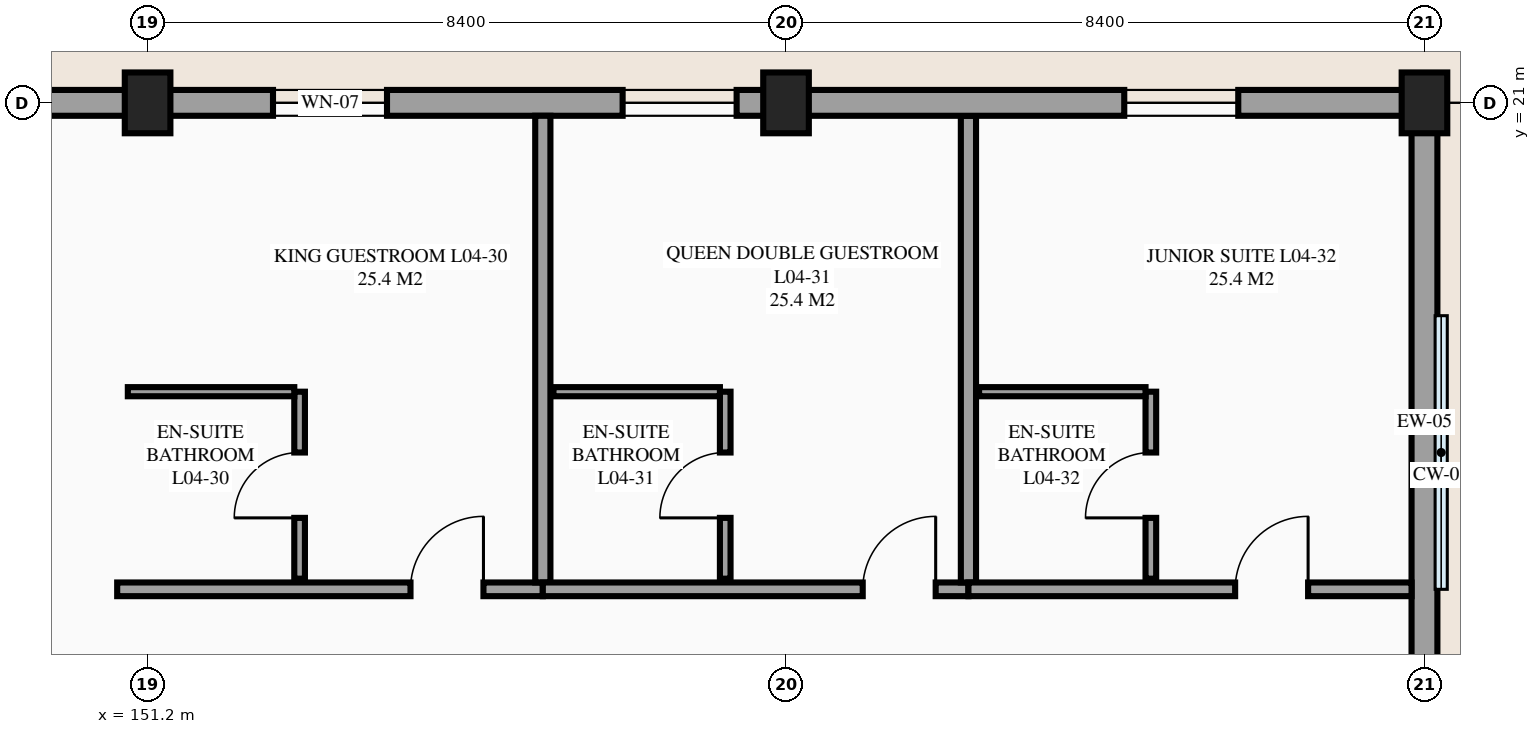
"""IFC4 building model, lengths in metres.
Left out: names, types, materials, properties, quantities, classifications, styles, units other than length and angle.
Written with IfcOpenShell. Run it as: python <this file> out.ifc"""

import sys

from ifc_helpers import new_model, si_unit, direction, frame, frame_2d, origin, origin_2d, place, context, subcontext, project, spatial, rectangle, extrude, element, fill, save


model = new_model("IFC4")
c1 = context("Model", 3, precision=1e-05, world=origin(), true_north=direction((0.0, 1.0)))
c2 = subcontext(c1, "Body", "Model", "MODEL_VIEW")
j1 = project(units=[si_unit("LENGTHUNIT", "METRE"), si_unit("PLANEANGLEUNIT", "RADIAN")], contexts=[c1])
p1 = place(None, origin())
s1 = spatial("IfcSite", under=j1, at=p1, CompositionType="ELEMENT")
p2 = place(p1, origin())
s2 = spatial("IfcBuilding", under=s1, at=p2, CompositionType="ELEMENT")
p3 = place(p2, frame((0.0, 0.0, 18.3)))
s3 = spatial("IfcBuildingStorey", under=s2, at=p3, CompositionType="ELEMENT", Elevation=18.3)
for number, where, z_axis, x_axis in (
    (1, (151.2, 21.0, 0.0), (0.0, 0.0, 1.0), (1.0, 0.0, 0.0)),
    (2, (159.6, 21.0, 0.0), (0.0, 0.0, 1.0), (1.0, 0.0, 0.0)),
    (3, (168.0, 21.0, 0.0), (0.0, 0.0, 1.0), (1.0, 0.0, 0.0)),
):
    element("IfcColumn", number, at=place(p3, frame(where, z_axis=z_axis, x_axis=x_axis)), inside=s3, PredefinedType="COLUMN", context=c2, shape_type="SweptSolid", body=[
        extrude(rectangle(XDim=0.6, YDim=0.8, at=origin_2d()), origin(), (0.0, 0.0, 1.0), 3.6),
    ])
p4 = place(p3, frame((168.0, 12.6, 0.0), z_axis=(0.0, 0.0, 1.0), x_axis=(0.0, 1.0, 0.0)))
e4 = element("IfcWall", 4, at=p4, inside=s3, PredefinedType="STANDARD", context=c2, shape_type="SweptSolid", body=[
    extrude(rectangle(XDim=8.4, YDim=0.34, at=frame_2d((4.2, 0.0))), origin(), (0.0, 0.0, 1.0), 2.43),
])
p5 = place(p3, frame((159.6, 21.0, 0.0), z_axis=(0.0, 0.0, 1.0), x_axis=(-1.0, 0.0, 0.0)))
e5 = element("IfcWall", 5, at=p5, inside=s3, PredefinedType="STANDARD", context=c2, shape_type="SweptSolid", body=[
    extrude(rectangle(XDim=8.4, YDim=0.34, at=frame_2d((4.2, 0.0))), origin(), (0.0, 0.0, 1.0), 2.63),
])
p6 = place(p5, frame((5.25, 0.0, 0.85)))
e6 = element("IfcOpeningElement", 6, at=p6, cuts=e5, PredefinedType="OPENING", context=c2, shape_type="SweptSolid", body=[
    extrude(rectangle(XDim=1.5, YDim=1.5, at=frame_2d((0.75, 0.75))), frame((0.0, 0.18, 0.0), z_axis=(0.0, -1.0, 0.0), x_axis=(1.0, 0.0, 0.0)), (0.0, 0.0, 1.0), 0.36),
])
p7 = place(p5, frame((0.65, 0.0, 0.85)))
e7 = element("IfcOpeningElement", 7, at=p7, cuts=e5, PredefinedType="OPENING", context=c2, shape_type="SweptSolid", body=[
    extrude(rectangle(XDim=1.5, YDim=1.5, at=frame_2d((0.75, 0.75))), frame((0.0, 0.18, 0.0), z_axis=(0.0, -1.0, 0.0), x_axis=(1.0, 0.0, 0.0)), (0.0, 0.0, 1.0), 0.36),
])
p8 = place(p3, frame((150.8, 14.6, 0.0), z_axis=(0.0, 0.0, 1.0), x_axis=(1.0, 0.0, 0.0)))
e8 = element("IfcWall", 8, at=p8, inside=s3, PredefinedType="PARTITIONING", context=c2, shape_type="SweptSolid", body=[
    extrude(rectangle(XDim=5.6, YDim=0.18, at=frame_2d((2.8, 0.0))), origin(), (0.0, 0.0, 1.0), 3.375),
])
p9 = place(p8, frame((3.859, 0.0, 0.0)))
e9 = element("IfcOpeningElement", 9, at=p9, cuts=e8, PredefinedType="OPENING", context=c2, shape_type="SweptSolid", body=[
    extrude(rectangle(XDim=0.96, YDim=2.15, at=frame_2d((0.48, 1.075))), frame((0.0, 0.1, 0.0), z_axis=(0.0, -1.0, 0.0), x_axis=(1.0, 0.0, 0.0)), (0.0, 0.0, 1.0), 0.2),
])
p10 = place(p3, frame((156.4, 14.69, 0.0), z_axis=(0.0, 0.0, 1.0), x_axis=(0.0, 1.0, 0.0)))
e10 = element("IfcWall", 10, at=p10, inside=s3, PredefinedType="PARTITIONING", context=c2, shape_type="SweptSolid", body=[
    extrude(rectangle(XDim=6.14, YDim=0.2, at=frame_2d((3.07, 0.0))), origin(), (0.0, 0.0, 1.0), 3.375),
])
p11 = place(p3, frame((153.2, 14.74, 0.0), z_axis=(0.0, 0.0, 1.0), x_axis=(0.0, 1.0, 0.0)))
e11 = element("IfcWall", 11, at=p11, inside=s3, PredefinedType="PARTITIONING", context=c2, shape_type="SweptSolid", body=[
    extrude(rectangle(XDim=2.46, YDim=0.14, at=frame_2d((1.23, 0.0))), origin(), (0.0, 0.0, 1.0), 3.375),
])
p12 = place(p11, frame((0.8, 0.0, 0.0)))
e12 = element("IfcOpeningElement", 12, at=p12, cuts=e11, PredefinedType="OPENING", context=c2, shape_type="SweptSolid", body=[
    extrude(rectangle(XDim=0.86, YDim=2.1, at=frame_2d((0.43, 1.05))), frame((0.0, 0.08, 0.0), z_axis=(0.0, -1.0, 0.0), x_axis=(1.0, 0.0, 0.0)), (0.0, 0.0, 1.0), 0.16),
])
p13 = place(p3, frame((150.94, 17.2, 0.0), z_axis=(0.0, 0.0, 1.0), x_axis=(1.0, 0.0, 0.0)))
e13 = element("IfcWall", 13, at=p13, inside=s3, PredefinedType="PARTITIONING", context=c2, shape_type="SweptSolid", body=[
    extrude(rectangle(XDim=2.19, YDim=0.12, at=frame_2d((1.095, 0.0))), origin(), (0.0, 0.0, 1.0), 3.375),
])
p14 = place(p3, frame((156.4, 14.6, 0.0), z_axis=(0.0, 0.0, 1.0), x_axis=(1.0, 0.0, 0.0)))
e14 = element("IfcWall", 14, at=p14, inside=s3, PredefinedType="PARTITIONING", context=c2, shape_type="SweptSolid", body=[
    extrude(rectangle(XDim=5.6, YDim=0.18, at=frame_2d((2.8, 0.0))), origin(), (0.0, 0.0, 1.0), 3.375),
])
p15 = place(p14, frame((4.209, 0.0, 0.0)))
e15 = element("IfcOpeningElement", 15, at=p15, cuts=e14, PredefinedType="OPENING", context=c2, shape_type="SweptSolid", body=[
    extrude(rectangle(XDim=0.96, YDim=2.15, at=frame_2d((0.48, 1.075))), frame((0.0, 0.1, 0.0), z_axis=(0.0, -1.0, 0.0), x_axis=(1.0, 0.0, 0.0)), (0.0, 0.0, 1.0), 0.2),
])
p16 = place(p3, frame((162.0, 14.69, 0.0), z_axis=(0.0, 0.0, 1.0), x_axis=(0.0, 1.0, 0.0)))
e16 = element("IfcWall", 16, at=p16, inside=s3, PredefinedType="PARTITIONING", context=c2, shape_type="SweptSolid", body=[
    extrude(rectangle(XDim=6.14, YDim=0.2, at=frame_2d((3.07, 0.0))), origin(), (0.0, 0.0, 1.0), 3.375),
])
p17 = place(p3, frame((158.8, 14.74, 0.0), z_axis=(0.0, 0.0, 1.0), x_axis=(0.0, 1.0, 0.0)))
e17 = element("IfcWall", 17, at=p17, inside=s3, PredefinedType="PARTITIONING", context=c2, shape_type="SweptSolid", body=[
    extrude(rectangle(XDim=2.46, YDim=0.14, at=frame_2d((1.23, 0.0))), origin(), (0.0, 0.0, 1.0), 3.375),
])
p18 = place(p17, frame((0.8, 0.0, 0.0)))
e18 = element("IfcOpeningElement", 18, at=p18, cuts=e17, PredefinedType="OPENING", context=c2, shape_type="SweptSolid", body=[
    extrude(rectangle(XDim=0.86, YDim=2.1, at=frame_2d((0.43, 1.05))), frame((0.0, 0.08, 0.0), z_axis=(0.0, -1.0, 0.0), x_axis=(1.0, 0.0, 0.0)), (0.0, 0.0, 1.0), 0.16),
])
p19 = place(p3, frame((156.54, 17.2, 0.0), z_axis=(0.0, 0.0, 1.0), x_axis=(1.0, 0.0, 0.0)))
e19 = element("IfcWall", 19, at=p19, inside=s3, PredefinedType="PARTITIONING", context=c2, shape_type="SweptSolid", body=[
    extrude(rectangle(XDim=2.19, YDim=0.12, at=frame_2d((1.095, 0.0))), origin(), (0.0, 0.0, 1.0), 3.375),
])
p20 = place(p3, frame((162.0, 14.6, 0.0), z_axis=(0.0, 0.0, 1.0), x_axis=(1.0, 0.0, 0.0)))
e20 = element("IfcWall", 20, at=p20, inside=s3, PredefinedType="PARTITIONING", context=c2, shape_type="SweptSolid", body=[
    extrude(rectangle(XDim=5.83, YDim=0.18, at=frame_2d((2.915, 0.0))), origin(), (0.0, 0.0, 1.0), 3.375),
])
p21 = place(p20, frame((3.509, 0.0, 0.0)))
e21 = element("IfcOpeningElement", 21, at=p21, cuts=e20, PredefinedType="OPENING", context=c2, shape_type="SweptSolid", body=[
    extrude(rectangle(XDim=0.96, YDim=2.15, at=frame_2d((0.48, 1.075))), frame((0.0, 0.1, 0.0), z_axis=(0.0, -1.0, 0.0), x_axis=(1.0, 0.0, 0.0)), (0.0, 0.0, 1.0), 0.2),
])
p22 = place(p3, frame((164.4, 14.74, 0.0), z_axis=(0.0, 0.0, 1.0), x_axis=(0.0, 1.0, 0.0)))
e22 = element("IfcWall", 22, at=p22, inside=s3, PredefinedType="PARTITIONING", context=c2, shape_type="SweptSolid", body=[
    extrude(rectangle(XDim=2.46, YDim=0.14, at=frame_2d((1.23, 0.0))), origin(), (0.0, 0.0, 1.0), 3.375),
])
p23 = place(p22, frame((0.8, 0.0, 0.0)))
e23 = element("IfcOpeningElement", 23, at=p23, cuts=e22, PredefinedType="OPENING", context=c2, shape_type="SweptSolid", body=[
    extrude(rectangle(XDim=0.86, YDim=2.1, at=frame_2d((0.43, 1.05))), frame((0.0, 0.08, 0.0), z_axis=(0.0, -1.0, 0.0), x_axis=(1.0, 0.0, 0.0)), (0.0, 0.0, 1.0), 0.16),
])
p24 = place(p3, frame((162.14, 17.2, 0.0), z_axis=(0.0, 0.0, 1.0), x_axis=(1.0, 0.0, 0.0)))
e24 = element("IfcWall", 24, at=p24, inside=s3, PredefinedType="PARTITIONING", context=c2, shape_type="SweptSolid", body=[
    extrude(rectangle(XDim=2.19, YDim=0.12, at=frame_2d((1.095, 0.0))), origin(), (0.0, 0.0, 1.0), 3.375),
])
p25 = place(p3, frame((168.0, 21.0, 0.0), z_axis=(0.0, 0.0, 1.0), x_axis=(-1.0, 0.0, 0.0)))
e25 = element("IfcWall", 25, at=p25, inside=s3, PredefinedType="STANDARD", context=c2, shape_type="SweptSolid", body=[
    extrude(rectangle(XDim=8.4, YDim=0.34, at=frame_2d((4.2, 0.0))), origin(), (0.0, 0.0, 1.0), 2.73),
])
p26 = place(p25, frame((2.45, 0.0, 0.85)))
e26 = element("IfcOpeningElement", 26, at=p26, cuts=e25, PredefinedType="OPENING", context=c2, shape_type="SweptSolid", body=[
    extrude(rectangle(XDim=1.5, YDim=1.5, at=frame_2d((0.75, 0.75))), frame((0.0, 0.18, 0.0), z_axis=(0.0, -1.0, 0.0), x_axis=(1.0, 0.0, 0.0)), (0.0, 0.0, 1.0), 0.36),
])
p27 = place(p3, frame((151.2, 21.0, 0.0), z_axis=(0.0, 0.0, 1.0), x_axis=(-1.0, 0.0, 0.0)))
e27 = element("IfcWall", 27, at=p27, inside=s3, PredefinedType="STANDARD", context=c2, shape_type="SweptSolid", body=[
    extrude(rectangle(XDim=2.0, YDim=0.34, at=frame_2d((1.0, 0.0))), origin(), (0.0, 0.0, 1.0), 2.88),
])
p28 = place(p6, origin())
e28 = element("IfcWindow", 28, at=p28, inside=s3, PartitioningType="SINGLE_PANEL", PredefinedType="WINDOW", context=c2, shape_type="SweptSolid", body=[
    extrude(rectangle(XDim=1.5, YDim=1.5, at=frame_2d((0.75, 0.75))), frame((0.0, 0.03, 0.0), z_axis=(0.0, -1.0, 0.0), x_axis=(1.0, 0.0, 0.0)), (0.0, 0.0, 1.0), 0.06),
])
fill(e6, e28)
p29 = place(p7, origin())
e29 = element("IfcWindow", 29, at=p29, inside=s3, PartitioningType="SINGLE_PANEL", PredefinedType="WINDOW", context=c2, shape_type="SweptSolid", body=[
    extrude(rectangle(XDim=1.5, YDim=1.5, at=frame_2d((0.75, 0.75))), frame((0.0, 0.03, 0.0), z_axis=(0.0, -1.0, 0.0), x_axis=(1.0, 0.0, 0.0)), (0.0, 0.0, 1.0), 0.06),
])
fill(e7, e29)
p30 = place(p26, origin())
e30 = element("IfcWindow", 30, at=p30, inside=s3, PartitioningType="SINGLE_PANEL", PredefinedType="WINDOW", context=c2, shape_type="SweptSolid", body=[
    extrude(rectangle(XDim=1.5, YDim=1.5, at=frame_2d((0.75, 0.75))), frame((0.0, 0.03, 0.0), z_axis=(0.0, -1.0, 0.0), x_axis=(1.0, 0.0, 0.0)), (0.0, 0.0, 1.0), 0.06),
])
fill(e26, e30)
p31 = place(p9, origin())
e31 = element("IfcDoor", 31, at=p31, inside=s3, OperationType="SINGLE_SWING_RIGHT", PredefinedType="DOOR", context=c2, shape_type="SweptSolid", body=[
    extrude(rectangle(XDim=0.96, YDim=2.15, at=frame_2d((0.48, 1.075))), frame((0.0, 0.025, 0.0), z_axis=(0.0, -1.0, 0.0), x_axis=(1.0, 0.0, 0.0)), (0.0, 0.0, 1.0), 0.05),
])
fill(e9, e31)
p32 = place(p12, origin())
e32 = element("IfcDoor", 32, at=p32, inside=s3, OperationType="SINGLE_SWING_LEFT", PredefinedType="DOOR", context=c2, shape_type="SweptSolid", body=[
    extrude(rectangle(XDim=0.86, YDim=2.1, at=frame_2d((0.43, 1.05))), frame((0.0, 0.025, 0.0), z_axis=(0.0, -1.0, 0.0), x_axis=(1.0, 0.0, 0.0)), (0.0, 0.0, 1.0), 0.05),
])
fill(e12, e32)
p33 = place(p15, origin())
e33 = element("IfcDoor", 33, at=p33, inside=s3, OperationType="SINGLE_SWING_RIGHT", PredefinedType="DOOR", context=c2, shape_type="SweptSolid", body=[
    extrude(rectangle(XDim=0.96, YDim=2.15, at=frame_2d((0.48, 1.075))), frame((0.0, 0.025, 0.0), z_axis=(0.0, -1.0, 0.0), x_axis=(1.0, 0.0, 0.0)), (0.0, 0.0, 1.0), 0.05),
])
fill(e15, e33)
p34 = place(p18, origin())
e34 = element("IfcDoor", 34, at=p34, inside=s3, OperationType="SINGLE_SWING_LEFT", PredefinedType="DOOR", context=c2, shape_type="SweptSolid", body=[
    extrude(rectangle(XDim=0.86, YDim=2.1, at=frame_2d((0.43, 1.05))), frame((0.0, 0.025, 0.0), z_axis=(0.0, -1.0, 0.0), x_axis=(1.0, 0.0, 0.0)), (0.0, 0.0, 1.0), 0.05),
])
fill(e18, e34)
p35 = place(p21, origin())
e35 = element("IfcDoor", 35, at=p35, inside=s3, OperationType="SINGLE_SWING_RIGHT", PredefinedType="DOOR", context=c2, shape_type="SweptSolid", body=[
    extrude(rectangle(XDim=0.96, YDim=2.15, at=frame_2d((0.48, 1.075))), frame((0.0, 0.025, 0.0), z_axis=(0.0, -1.0, 0.0), x_axis=(1.0, 0.0, 0.0)), (0.0, 0.0, 1.0), 0.05),
])
fill(e21, e35)
p36 = place(p23, origin())
e36 = element("IfcDoor", 36, at=p36, inside=s3, OperationType="SINGLE_SWING_LEFT", PredefinedType="DOOR", context=c2, shape_type="SweptSolid", body=[
    extrude(rectangle(XDim=0.86, YDim=2.1, at=frame_2d((0.43, 1.05))), frame((0.0, 0.025, 0.0), z_axis=(0.0, -1.0, 0.0), x_axis=(1.0, 0.0, 0.0)), (0.0, 0.0, 1.0), 0.05),
])
fill(e23, e36)
save(model, sys.argv[1])
